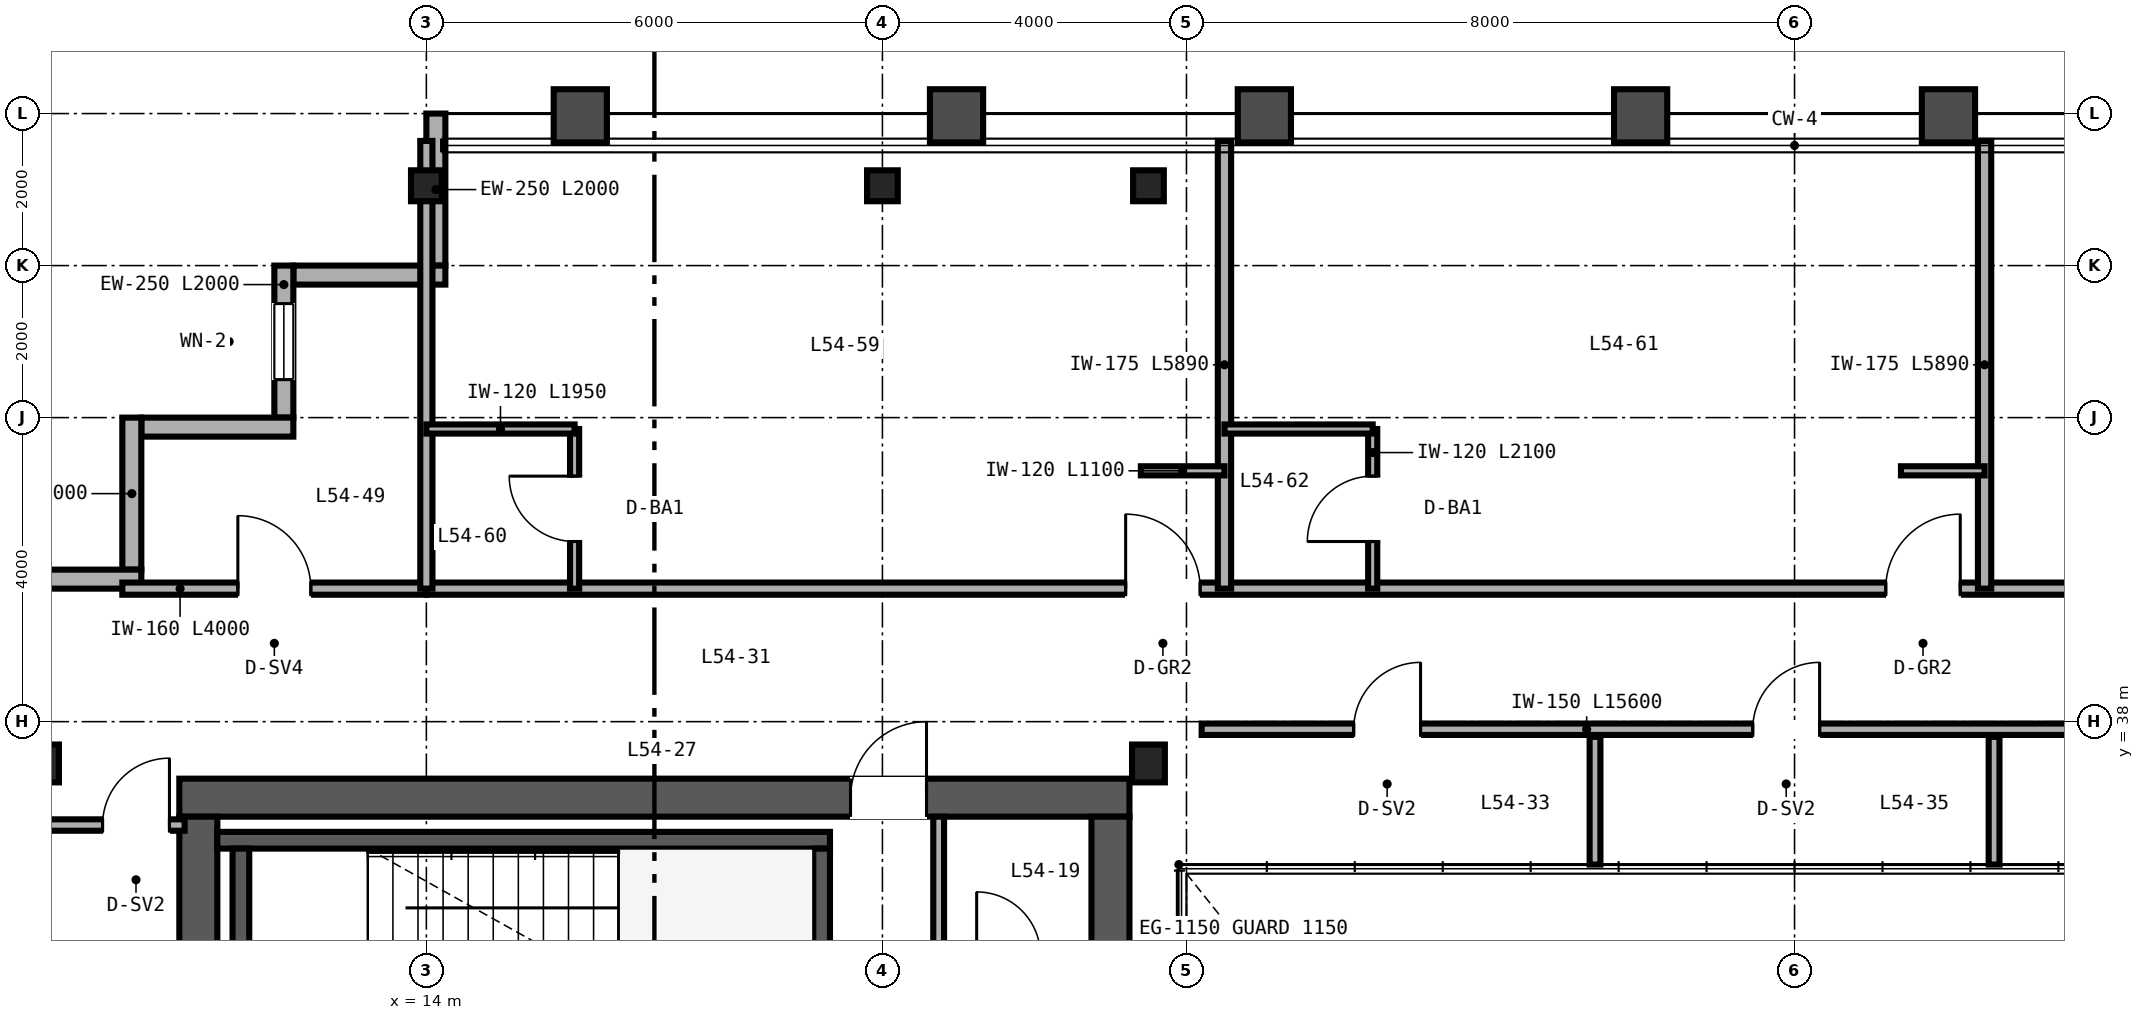
"""IFC4 building model, lengths in metres.
Left out: names, types, materials, properties, quantities, classifications, styles, units other than length and angle.
Written with IfcOpenShell. Run it as: python <this file> out.ifc"""

import sys

from ifc_helpers import new_model, si_unit, direction, frame, frame_2d, origin, origin_2d, place, context, subcontext, project, spatial, rectangle, i_section, extrude, source, transform, mapped, element, fill, save


model = new_model("IFC4")
c1 = context("Model", 3, precision=1e-05, world=origin(), true_north=direction((0.0, 1.0)))
c2 = subcontext(c1, "Body", "Model", "MODEL_VIEW")
j1 = project(units=[si_unit("LENGTHUNIT", "METRE"), si_unit("PLANEANGLEUNIT", "RADIAN")], contexts=[c1])
p1 = place(None, origin())
s1 = spatial("IfcSite", under=j1, at=p1, CompositionType="ELEMENT")
p2 = place(p1, origin())
s2 = spatial("IfcBuilding", under=s1, at=p2, CompositionType="ELEMENT")
p3 = place(p2, frame((0.0, 0.0, 213.6)))
s3 = spatial("IfcBuildingStorey", under=s2, at=p3, CompositionType="ELEMENT", Elevation=213.6)
p4 = place(p3, frame((10.75, 37.0, 0.0), z_axis=(0.0, 0.0, 1.0), x_axis=(1.0, 0.0, 0.0)))
e1 = element("IfcWall", 1, at=p4, inside=s3, PredefinedType="SHEAR", context=c2, shape_type="SweptSolid", body=[
    extrude(rectangle(XDim=12.5, YDim=0.5, at=frame_2d((6.25, 0.0))), origin(), (0.0, 0.0, 1.0), 3.37),
])
p5 = place(p4, frame((8.83, 0.0, 0.0)))
e2 = element("IfcOpeningElement", 2, at=p5, cuts=e1, PredefinedType="OPENING", context=c2, shape_type="SweptSolid", body=[
    extrude(rectangle(XDim=1.0, YDim=2.15, at=frame_2d((0.5, 1.075))), frame((0.0, 0.26, 0.0), z_axis=(0.0, -1.0, 0.0), x_axis=(1.0, 0.0, 0.0)), (0.0, 0.0, 1.0), 0.52),
])
for number, where, z_axis, x_axis in (
    (3, (11.0, 15.25, 0.0), (0.0, 0.0, 1.0), (0.0, 1.0, 0.0)),
    (4, (23.0, 15.25, 0.0), (0.0, 0.0, 1.0), (0.0, 1.0, 0.0)),
):
    element("IfcWall", number, at=place(p3, frame(where, z_axis=z_axis, x_axis=x_axis)), inside=s3, PredefinedType="SHEAR", context=c2, shape_type="SweptSolid", body=[
        extrude(rectangle(XDim=21.5, YDim=0.5, at=frame_2d((10.75, 0.0))), origin(), (0.0, 0.0, 1.0), 3.37),
    ])
p6 = place(p3, frame((11.25, 36.44, 0.0), z_axis=(0.0, 0.0, 1.0), x_axis=(1.0, 0.0, 0.0)))
e5 = element("IfcWall", 5, at=p6, inside=s3, PredefinedType="SHEAR", context=c2, shape_type="SweptSolid", body=[
    extrude(rectangle(XDim=8.06, YDim=0.22, at=frame_2d((4.03, 0.0))), origin(), (0.0, 0.0, 1.0), 3.4),
])
for number, where, z_axis, x_axis in (
    (6, (11.56, 33.05, 0.0), (0.0, 0.0, 1.0), (0.0, 1.0, 0.0)),
    (7, (19.2, 33.05, 0.0), (0.0, 0.0, 1.0), (0.0, 1.0, 0.0)),
):
    element("IfcWall", number, at=place(p3, frame(where, z_axis=z_axis, x_axis=x_axis)), inside=s3, PredefinedType="SHEAR", context=c2, shape_type="SweptSolid", body=[
        extrude(rectangle(XDim=3.28, YDim=0.22, at=frame_2d((1.64, 0.0))), origin(), (0.0, 0.0, 1.0), 3.4),
    ])
m1 = source(origin(), c2, "Body", "SweptSolid", [
    extrude(i_section(OverallWidth=0.432, OverallDepth=0.498, WebThickness=0.056, FlangeThickness=0.089, FilletRadius=0.025, at=origin_2d()), origin(), (0.0, 0.0, 1.0), 3.37),
])
for number, where, z_axis, x_axis in (
    (8, (8.95, 37.45, 0.0), (0.0, 0.0, 1.0), (1.0, 0.0, 0.0)),
    (9, (23.5, 37.45, 0.0), (0.0, 0.0, 1.0), (1.0, 0.0, 0.0)),
):
    element("IfcColumn", number, at=place(p3, frame(where, z_axis=z_axis, x_axis=x_axis)), inside=s3, PredefinedType="COLUMN", context=c2, shape_type="MappedRepresentation", body=[
        mapped(m1, transform((0.0, 0.0, 0.0), scale=1.0)),
    ])
m2 = source(origin(), c2, "Body", "SweptSolid", [
    extrude(i_section(OverallWidth=0.404, OverallDepth=0.407, WebThickness=0.027, FlangeThickness=0.044, FilletRadius=0.025, at=origin_2d()), origin(), (0.0, 0.0, 1.0), 3.37),
])
for number, where, z_axis, x_axis in (
    (10, (14.0, 45.05, 0.0), (0.0, 0.0, 1.0), (1.0, 0.0, 0.0)),
    (11, (20.0, 45.05, 0.0), (0.0, 0.0, 1.0), (1.0, 0.0, 0.0)),
    (12, (23.5, 45.05, 0.0), (0.0, 0.0, 1.0), (1.0, 0.0, 0.0)),
):
    element("IfcColumn", number, at=place(p3, frame(where, z_axis=z_axis, x_axis=x_axis)), inside=s3, PredefinedType="COLUMN", context=c2, shape_type="MappedRepresentation", body=[
        mapped(m2, transform((0.0, 0.0, 0.0), scale=1.0)),
    ])
p7 = place(p3, frame((14.125, 46.0, 0.0), z_axis=(0.0, 0.0, 1.0), x_axis=(0.0, -1.0, 0.0)))
e13 = element("IfcWall", 13, at=p7, inside=s3, PredefinedType="SOLIDWALL", context=c2, shape_type="SweptSolid", body=[
    extrude(rectangle(XDim=2.0, YDim=0.25, at=frame_2d((1.0, 0.0))), origin(), (0.0, 0.0, 1.0), 2.677),
])
p8 = place(p3, frame((14.25, 43.875, 0.0), z_axis=(0.0, 0.0, 1.0), x_axis=(-1.0, 0.0, 0.0)))
e14 = element("IfcWall", 14, at=p8, inside=s3, PredefinedType="SOLIDWALL", context=c2, shape_type="SweptSolid", body=[
    extrude(rectangle(XDim=2.0, YDim=0.25, at=frame_2d((1.0, 0.0))), origin(), (0.0, 0.0, 1.0), 3.37),
])
p9 = place(p3, frame((12.125, 44.0, 0.0), z_axis=(0.0, 0.0, 1.0), x_axis=(0.0, -1.0, 0.0)))
e15 = element("IfcWall", 15, at=p9, inside=s3, PredefinedType="SOLIDWALL", context=c2, shape_type="SweptSolid", body=[
    extrude(rectangle(XDim=2.0, YDim=0.25, at=frame_2d((1.0, 0.0))), origin(), (0.0, 0.0, 1.0), 3.37),
])
p10 = place(p9, frame((0.5, 0.0, 0.85)))
e16 = element("IfcOpeningElement", 16, at=p10, cuts=e15, PredefinedType="OPENING", context=c2, shape_type="SweptSolid", body=[
    extrude(rectangle(XDim=1.0, YDim=1.9, at=frame_2d((0.5, 0.95))), frame((0.0, 0.135, 0.0), z_axis=(0.0, -1.0, 0.0), x_axis=(1.0, 0.0, 0.0)), (0.0, 0.0, 1.0), 0.27),
])
for number, where, z_axis, x_axis in (
    (17, (12.25, 41.875, 0.0), (0.0, 0.0, 1.0), (-1.0, 0.0, 0.0)),
    (18, (10.125, 42.0, 0.0), (0.0, 0.0, 1.0), (0.0, -1.0, 0.0)),
):
    element("IfcWall", number, at=place(p3, frame(where, z_axis=z_axis, x_axis=x_axis)), inside=s3, PredefinedType="SOLIDWALL", context=c2, shape_type="SweptSolid", body=[
        extrude(rectangle(XDim=2.0, YDim=0.25, at=frame_2d((1.0, 0.0))), origin(), (0.0, 0.0, 1.0), 3.37),
    ])
p11 = place(p3, frame((10.25, 39.875, 0.0), z_axis=(0.0, 0.0, 1.0), x_axis=(-1.0, 0.0, 0.0)))
e19 = element("IfcWall", 19, at=p11, inside=s3, PredefinedType="SOLIDWALL", context=c2, shape_type="SweptSolid", body=[
    extrude(rectangle(XDim=2.25, YDim=0.25, at=frame_2d((1.125, 0.0))), origin(), (0.0, 0.0, 1.0), 3.37),
])
p12 = place(p3, frame((20.74, 34.92, 0.0), z_axis=(0.0, 0.0, 1.0), x_axis=(0.0, 1.0, 0.0)))
e20 = element("IfcWall", 20, at=p12, inside=s3, PredefinedType="PARTITIONING", context=c2, shape_type="SweptSolid", body=[
    extrude(rectangle(XDim=1.83, YDim=0.142, at=frame_2d((0.915, 0.0))), origin(), (0.0, 0.0, 1.0), 3.37),
])
p13 = place(p3, frame((24.2, 37.9, 0.0), z_axis=(0.0, 0.0, 1.0), x_axis=(1.0, 0.0, 0.0)))
e21 = element("IfcWall", 21, at=p13, inside=s3, PredefinedType="PARTITIONING", context=c2, shape_type="SweptSolid", body=[
    extrude(rectangle(XDim=15.6, YDim=0.15, at=frame_2d((7.8, 0.0))), origin(), (0.0, 0.0, 1.0), 3.37),
])
p14 = place(p13, frame((2.0, 0.0, 0.0)))
e22 = element("IfcOpeningElement", 22, at=p14, cuts=e21, PredefinedType="OPENING", context=c2, shape_type="SweptSolid", body=[
    extrude(rectangle(XDim=0.88, YDim=2.15, at=frame_2d((0.44, 1.075))), frame((0.0, 0.085, 0.0), z_axis=(0.0, -1.0, 0.0), x_axis=(1.0, 0.0, 0.0)), (0.0, 0.0, 1.0), 0.17),
])
p15 = place(p13, frame((7.25, 0.0, 0.0)))
e23 = element("IfcOpeningElement", 23, at=p15, cuts=e21, PredefinedType="OPENING", context=c2, shape_type="SweptSolid", body=[
    extrude(rectangle(XDim=0.88, YDim=2.15, at=frame_2d((0.44, 1.075))), frame((0.0, 0.085, 0.0), z_axis=(0.0, -1.0, 0.0), x_axis=(1.0, 0.0, 0.0)), (0.0, 0.0, 1.0), 0.17),
])
p16 = place(p13, frame((12.5, 0.0, 0.0)))
e24 = element("IfcOpeningElement", 24, at=p16, cuts=e21, PredefinedType="OPENING", context=c2, shape_type="SweptSolid", body=[
    extrude(rectangle(XDim=0.88, YDim=2.15, at=frame_2d((0.44, 1.075))), frame((0.0, 0.085, 0.0), z_axis=(0.0, -1.0, 0.0), x_axis=(1.0, 0.0, 0.0)), (0.0, 0.0, 1.0), 0.17),
])
for number, where, z_axis, x_axis in (
    (25, (29.375, 36.12, 0.0), (0.0, 0.0, 1.0), (0.0, 1.0, 0.0)),
    (26, (34.625, 36.12, 0.0), (0.0, 0.0, 1.0), (0.0, 1.0, 0.0)),
):
    element("IfcWall", number, at=place(p3, frame(where, z_axis=z_axis, x_axis=x_axis)), inside=s3, PredefinedType="PARTITIONING", context=c2, shape_type="SweptSolid", body=[
        extrude(rectangle(XDim=1.68, YDim=0.142, at=frame_2d((0.84, 0.0))), origin(), (0.0, 0.0, 1.0), 3.37),
    ])
p17 = place(p3, frame((8.16, 36.64, 0.0), z_axis=(0.0, 0.0, 1.0), x_axis=(1.0, 0.0, 0.0)))
e27 = element("IfcWall", 27, at=p17, inside=s3, PredefinedType="PARTITIONING", context=c2, shape_type="SweptSolid", body=[
    extrude(rectangle(XDim=2.66, YDim=0.15, at=frame_2d((1.33, 0.0))), origin(), (0.0, 0.0, 1.0), 2.753),
])
p18 = place(p17, frame((1.58, 0.0, 0.0)))
e28 = element("IfcOpeningElement", 28, at=p18, cuts=e27, PredefinedType="OPENING", context=c2, shape_type="SweptSolid", body=[
    extrude(rectangle(XDim=0.88, YDim=2.15, at=frame_2d((0.44, 1.075))), frame((0.0, 0.085, 0.0), z_axis=(0.0, -1.0, 0.0), x_axis=(1.0, 0.0, 0.0)), (0.0, 0.0, 1.0), 0.17),
])
p19 = place(p3, frame((10.0, 39.75, 0.0), z_axis=(0.0, 0.0, 1.0), x_axis=(1.0, 0.0, 0.0)))
e29 = element("IfcWall", 29, at=p19, inside=s3, PredefinedType="PARTITIONING", context=c2, shape_type="SweptSolid", body=[
    extrude(rectangle(XDim=4.0, YDim=0.16, at=frame_2d((2.0, 0.0))), origin(), (0.0, 0.0, 1.0), 3.37),
])
p20 = place(p19, frame((1.52, 0.0, 0.0)))
e30 = element("IfcOpeningElement", 30, at=p20, cuts=e29, PredefinedType="OPENING", context=c2, shape_type="SweptSolid", body=[
    extrude(rectangle(XDim=0.96, YDim=2.15, at=frame_2d((0.48, 1.075))), frame((0.0, 0.09, 0.0), z_axis=(0.0, -1.0, 0.0), x_axis=(1.0, 0.0, 0.0)), (0.0, 0.0, 1.0), 0.18),
])
p21 = place(p3, frame((14.0, 39.75, 0.0), z_axis=(0.0, 0.0, 1.0), x_axis=(1.0, 0.0, 0.0)))
e31 = element("IfcWall", 31, at=p21, inside=s3, PredefinedType="PARTITIONING", context=c2, shape_type="SweptSolid", body=[
    extrude(rectangle(XDim=36.0, YDim=0.16, at=frame_2d((18.0, 0.0))), origin(), (0.0, 0.0, 1.0), 2.913),
])
p22 = place(p21, frame((9.2, 0.0, 0.0)))
e32 = element("IfcOpeningElement", 32, at=p22, cuts=e31, PredefinedType="OPENING", context=c2, shape_type="SweptSolid", body=[
    extrude(rectangle(XDim=0.98, YDim=2.2, at=frame_2d((0.49, 1.1))), frame((0.0, 0.09, 0.0), z_axis=(0.0, -1.0, 0.0), x_axis=(1.0, 0.0, 0.0)), (0.0, 0.0, 1.0), 0.18),
])
p23 = place(p21, frame((19.2, 0.0, 0.0)))
e33 = element("IfcOpeningElement", 33, at=p23, cuts=e31, PredefinedType="OPENING", context=c2, shape_type="SweptSolid", body=[
    extrude(rectangle(XDim=0.98, YDim=2.2, at=frame_2d((0.49, 1.1))), frame((0.0, 0.09, 0.0), z_axis=(0.0, -1.0, 0.0), x_axis=(1.0, 0.0, 0.0)), (0.0, 0.0, 1.0), 0.18),
])
p24 = place(p21, frame((24.52, 0.0, 0.0)))
e34 = element("IfcOpeningElement", 34, at=p24, cuts=e31, PredefinedType="OPENING", context=c2, shape_type="SweptSolid", body=[
    extrude(rectangle(XDim=0.96, YDim=2.15, at=frame_2d((0.48, 1.075))), frame((0.0, 0.09, 0.0), z_axis=(0.0, -1.0, 0.0), x_axis=(1.0, 0.0, 0.0)), (0.0, 0.0, 1.0), 0.18),
])
p25 = place(p21, frame((34.74, 0.0, 0.0)))
e35 = element("IfcOpeningElement", 35, at=p25, cuts=e31, PredefinedType="OPENING", context=c2, shape_type="SweptSolid", body=[
    extrude(rectangle(XDim=0.94, YDim=2.15, at=frame_2d((0.47, 1.075))), frame((0.0, 0.09, 0.0), z_axis=(0.0, -1.0, 0.0), x_axis=(1.0, 0.0, 0.0)), (0.0, 0.0, 1.0), 0.18),
])
p26 = place(p3, frame((14.0, 39.75, 0.0), z_axis=(0.0, 0.0, 1.0), x_axis=(0.0, 1.0, 0.0)))
e36 = element("IfcWall", 36, at=p26, inside=s3, PredefinedType="PARTITIONING", context=c2, shape_type="SweptSolid", body=[
    extrude(rectangle(XDim=5.89, YDim=0.16, at=frame_2d((2.945, 0.0))), origin(), (0.0, 0.0, 1.0), 2.677),
])
p27 = place(p3, frame((24.5, 39.75, 0.0), z_axis=(0.0, 0.0, 1.0), x_axis=(0.0, 1.0, 0.0)))
e37 = element("IfcWall", 37, at=p27, inside=s3, PredefinedType="PARTITIONING", context=c2, shape_type="SweptSolid", body=[
    extrude(rectangle(XDim=5.89, YDim=0.175, at=frame_2d((2.945, 0.0))), origin(), (0.0, 0.0, 1.0), 2.443),
])
p28 = place(p3, frame((15.95, 39.75, 0.0), z_axis=(0.0, 0.0, 1.0), x_axis=(0.0, 1.0, 0.0)))
e38 = element("IfcWall", 38, at=p28, inside=s3, PredefinedType="PARTITIONING", context=c2, shape_type="SweptSolid", body=[
    extrude(rectangle(XDim=2.1, YDim=0.12, at=frame_2d((1.05, 0.0))), origin(), (0.0, 0.0, 1.0), 3.37),
])
p29 = place(p28, frame((0.62, 0.0, 0.0)))
e39 = element("IfcOpeningElement", 39, at=p29, cuts=e38, PredefinedType="OPENING", context=c2, shape_type="SweptSolid", body=[
    extrude(rectangle(XDim=0.86, YDim=2.1, at=frame_2d((0.43, 1.05))), frame((0.0, 0.07, 0.0), z_axis=(0.0, -1.0, 0.0), x_axis=(1.0, 0.0, 0.0)), (0.0, 0.0, 1.0), 0.14),
])
p30 = place(p3, frame((14.0, 41.85, 0.0), z_axis=(0.0, 0.0, 1.0), x_axis=(1.0, 0.0, 0.0)))
e40 = element("IfcWall", 40, at=p30, inside=s3, PredefinedType="PARTITIONING", context=c2, shape_type="SweptSolid", body=[
    extrude(rectangle(XDim=1.95, YDim=0.12, at=frame_2d((0.975, 0.0))), origin(), (0.0, 0.0, 1.0), 3.37),
])
p31 = place(p3, frame((23.4, 41.3, 0.0), z_axis=(0.0, 0.0, 1.0), x_axis=(1.0, 0.0, 0.0)))
e41 = element("IfcWall", 41, at=p31, inside=s3, PredefinedType="PARTITIONING", context=c2, shape_type="SweptSolid", body=[
    extrude(rectangle(XDim=1.1, YDim=0.12, at=frame_2d((0.55, 0.0))), origin(), (0.0, 0.0, 1.0), 2.913),
])
p32 = place(p3, frame((34.5, 39.75, 0.0), z_axis=(0.0, 0.0, 1.0), x_axis=(0.0, 1.0, 0.0)))
e42 = element("IfcWall", 42, at=p32, inside=s3, PredefinedType="PARTITIONING", context=c2, shape_type="SweptSolid", body=[
    extrude(rectangle(XDim=5.89, YDim=0.175, at=frame_2d((2.945, 0.0))), origin(), (0.0, 0.0, 1.0), 2.443),
])
p33 = place(p3, frame((26.45, 39.75, 0.0), z_axis=(0.0, 0.0, 1.0), x_axis=(0.0, 1.0, 0.0)))
e43 = element("IfcWall", 43, at=p33, inside=s3, PredefinedType="PARTITIONING", context=c2, shape_type="SweptSolid", body=[
    extrude(rectangle(XDim=2.1, YDim=0.12, at=frame_2d((1.05, 0.0))), origin(), (0.0, 0.0, 1.0), 3.37),
])
p34 = place(p33, frame((0.62, 0.0, 0.0)))
e44 = element("IfcOpeningElement", 44, at=p34, cuts=e43, PredefinedType="OPENING", context=c2, shape_type="SweptSolid", body=[
    extrude(rectangle(XDim=0.86, YDim=2.1, at=frame_2d((0.43, 1.05))), frame((0.0, 0.07, 0.0), z_axis=(0.0, -1.0, 0.0), x_axis=(1.0, 0.0, 0.0)), (0.0, 0.0, 1.0), 0.14),
])
p35 = place(p3, frame((24.5, 41.85, 0.0), z_axis=(0.0, 0.0, 1.0), x_axis=(1.0, 0.0, 0.0)))
e45 = element("IfcWall", 45, at=p35, inside=s3, PredefinedType="PARTITIONING", context=c2, shape_type="SweptSolid", body=[
    extrude(rectangle(XDim=1.95, YDim=0.12, at=frame_2d((0.975, 0.0))), origin(), (0.0, 0.0, 1.0), 3.37),
])
p36 = place(p3, frame((33.4, 41.3, 0.0), z_axis=(0.0, 0.0, 1.0), x_axis=(1.0, 0.0, 0.0)))
e46 = element("IfcWall", 46, at=p36, inside=s3, PredefinedType="PARTITIONING", context=c2, shape_type="SweptSolid", body=[
    extrude(rectangle(XDim=1.1, YDim=0.12, at=frame_2d((0.55, 0.0))), origin(), (0.0, 0.0, 1.0), 3.37),
])
m3 = source(origin(), c2, "Body", "SweptSolid", [
    extrude(rectangle(XDim=1.0, YDim=1.9, at=frame_2d((0.5, 0.95))), frame((0.0, 0.03, 0.0), z_axis=(0.0, -1.0, 0.0), x_axis=(1.0, 0.0, 0.0)), (0.0, 0.0, 1.0), 0.06),
])
p37 = place(p10, origin())
e47 = element("IfcWindow", 47, at=p37, inside=s3, PartitioningType="SINGLE_PANEL", PredefinedType="WINDOW", context=c2, shape_type="MappedRepresentation", body=[
    mapped(m3, transform((0.0, 0.0, 0.0), scale=1.0)),
])
fill(e16, e47)
m4 = source(origin(), c2, "Body", "SweptSolid", [
    extrude(rectangle(XDim=1.0, YDim=2.15, at=frame_2d((0.5, 1.075))), frame((0.0, 0.025, 0.0), z_axis=(0.0, -1.0, 0.0), x_axis=(1.0, 0.0, 0.0)), (0.0, 0.0, 1.0), 0.05),
])
p38 = place(p5, origin())
e48 = element("IfcDoor", 48, at=p38, inside=s3, OperationType="SINGLE_SWING_RIGHT", PredefinedType="DOOR", context=c2, shape_type="MappedRepresentation", body=[
    mapped(m4, transform((0.0, 0.0, 0.0), scale=1.0)),
])
fill(e2, e48)
m5 = source(origin(), c2, "Body", "SweptSolid", [
    extrude(rectangle(XDim=0.88, YDim=2.15, at=frame_2d((0.44, 1.075))), frame((0.0, 0.025, 0.0), z_axis=(0.0, -1.0, 0.0), x_axis=(1.0, 0.0, 0.0)), (0.0, 0.0, 1.0), 0.05),
])
p39 = place(p14, origin())
e49 = element("IfcDoor", 49, at=p39, inside=s3, OperationType="SINGLE_SWING_RIGHT", PredefinedType="DOOR", context=c2, shape_type="MappedRepresentation", body=[
    mapped(m5, transform((0.0, 0.0, 0.0), scale=1.0)),
])
fill(e22, e49)
p40 = place(p15, origin())
e50 = element("IfcDoor", 50, at=p40, inside=s3, OperationType="SINGLE_SWING_RIGHT", PredefinedType="DOOR", context=c2, shape_type="MappedRepresentation", body=[
    mapped(m5, transform((0.0, 0.0, 0.0), scale=1.0)),
])
fill(e23, e50)
p41 = place(p18, origin())
e51 = element("IfcDoor", 51, at=p41, inside=s3, OperationType="SINGLE_SWING_RIGHT", PredefinedType="DOOR", context=c2, shape_type="MappedRepresentation", body=[
    mapped(m5, transform((0.0, 0.0, 0.0), scale=1.0)),
])
fill(e28, e51)
m6 = source(origin(), c2, "Body", "SweptSolid", [
    extrude(rectangle(XDim=0.96, YDim=2.15, at=frame_2d((0.48, 1.075))), frame((0.0, 0.025, 0.0), z_axis=(0.0, -1.0, 0.0), x_axis=(1.0, 0.0, 0.0)), (0.0, 0.0, 1.0), 0.05),
])
p42 = place(p20, origin())
e52 = element("IfcDoor", 52, at=p42, inside=s3, OperationType="SINGLE_SWING_LEFT", PredefinedType="DOOR", context=c2, shape_type="MappedRepresentation", body=[
    mapped(m6, transform((0.0, 0.0, 0.0), scale=1.0)),
])
fill(e30, e52)
m7 = source(origin(), c2, "Body", "SweptSolid", [
    extrude(rectangle(XDim=0.86, YDim=2.1, at=frame_2d((0.43, 1.05))), frame((0.0, 0.025, 0.0), z_axis=(0.0, -1.0, 0.0), x_axis=(1.0, 0.0, 0.0)), (0.0, 0.0, 1.0), 0.05),
])
p43 = place(p29, origin())
e53 = element("IfcDoor", 53, at=p43, inside=s3, OperationType="SINGLE_SWING_RIGHT", PredefinedType="DOOR", context=c2, shape_type="MappedRepresentation", body=[
    mapped(m7, transform((0.0, 0.0, 0.0), scale=1.0)),
])
fill(e39, e53)
p44 = place(p34, origin())
e54 = element("IfcDoor", 54, at=p44, inside=s3, OperationType="SINGLE_SWING_LEFT", PredefinedType="DOOR", context=c2, shape_type="MappedRepresentation", body=[
    mapped(m7, transform((0.0, 0.0, 0.0), scale=1.0)),
])
fill(e44, e54)
m8 = source(origin(), c2, "Body", "SweptSolid", [
    extrude(rectangle(XDim=0.98, YDim=2.2, at=frame_2d((0.49, 1.1))), frame((0.0, 0.025, 0.0), z_axis=(0.0, -1.0, 0.0), x_axis=(1.0, 0.0, 0.0)), (0.0, 0.0, 1.0), 0.05),
])
p45 = place(p22, origin())
e55 = element("IfcDoor", 55, at=p45, inside=s3, OperationType="SINGLE_SWING_LEFT", PredefinedType="DOOR", context=c2, shape_type="MappedRepresentation", body=[
    mapped(m8, transform((0.0, 0.0, 0.0), scale=1.0)),
])
fill(e32, e55)
p46 = place(p23, origin())
e56 = element("IfcDoor", 56, at=p46, inside=s3, OperationType="SINGLE_SWING_RIGHT", PredefinedType="DOOR", context=c2, shape_type="MappedRepresentation", body=[
    mapped(m8, transform((0.0, 0.0, 0.0), scale=1.0)),
])
fill(e33, e56)
save(model, sys.argv[1])
